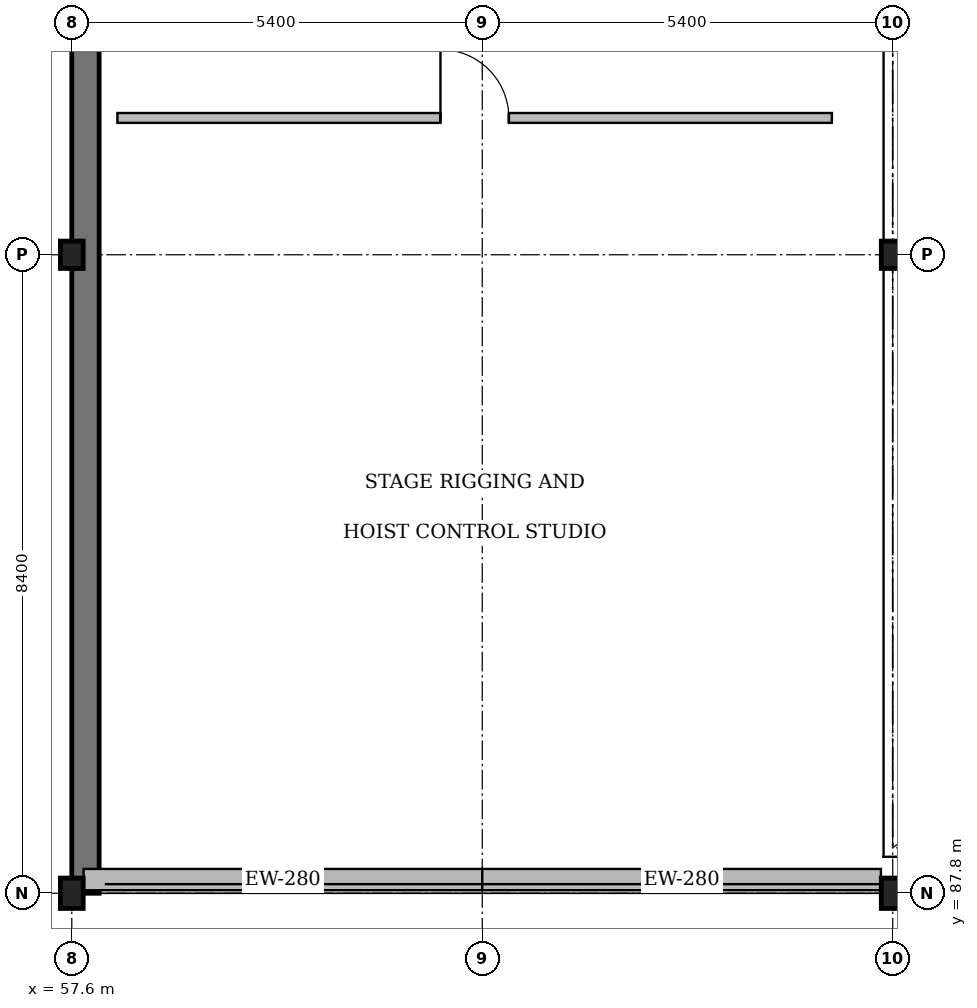
"""IFC4 building model, lengths in metres.
Left out: names, types, materials, properties, quantities, classifications, styles, units other than length and angle.
Written with IfcOpenShell. Run it as: python <this file> out.ifc"""

import sys

from ifc_helpers import new_model, si_unit, direction, frame, frame_2d, origin, origin_2d, place, context, subcontext, project, spatial, rectangle, i_section, extrude, element, fill, save


model = new_model("IFC4")
c1 = context("Model", 3, precision=1e-05, world=origin(), true_north=direction((0.0, 1.0)))
c2 = subcontext(c1, "Body", "Model", "MODEL_VIEW")
j1 = project(units=[si_unit("LENGTHUNIT", "METRE"), si_unit("PLANEANGLEUNIT", "RADIAN")], contexts=[c1])
p1 = place(None, origin())
s1 = spatial("IfcSite", under=j1, at=p1, CompositionType="ELEMENT")
p2 = place(p1, origin())
s2 = spatial("IfcBuilding", under=s1, at=p2, CompositionType="ELEMENT")
p3 = place(p2, frame((0.0, 0.0, 17.1)))
s3 = spatial("IfcBuildingStorey", under=s2, at=p3, CompositionType="ELEMENT", Elevation=17.1)
p4 = place(p3, frame((68.4, 87.8, 0.0), z_axis=(0.0, 0.0, 1.0), x_axis=(1.0, 0.0, 0.0)))
e1 = element("IfcColumn", 1, at=p4, inside=s3, PredefinedType="COLUMN", context=c2, shape_type="SweptSolid", body=[
    extrude(i_section(OverallWidth=0.3, OverallDepth=0.4, WebThickness=0.013, FlangeThickness=0.024, FilletRadius=0.027, at=origin_2d()), origin(), (0.0, 0.0, 1.0), 3.9),
])
p5 = place(p3, frame((68.4, 96.2, 0.0), z_axis=(0.0, 0.0, 1.0), x_axis=(1.0, 0.0, 0.0)))
e2 = element("IfcColumn", 2, at=p5, inside=s3, PredefinedType="COLUMN", context=c2, shape_type="SweptSolid", body=[
    extrude(i_section(OverallWidth=0.3, OverallDepth=0.36, WebThickness=0.012, FlangeThickness=0.022, FilletRadius=0.027, at=origin_2d()), origin(), (0.0, 0.0, 1.0), 3.9),
])
p6 = place(p3, frame((57.6, 87.8, 0.0), z_axis=(0.0, 0.0, 1.0), x_axis=(1.0, 0.0, 0.0)))
e3 = element("IfcColumn", 3, at=p6, inside=s3, PredefinedType="COLUMN", context=c2, shape_type="SweptSolid", body=[
    extrude(i_section(OverallWidth=0.3, OverallDepth=0.4, WebThickness=0.013, FlangeThickness=0.024, FilletRadius=0.027, at=origin_2d()), origin(), (0.0, 0.0, 1.0), 3.9),
])
p7 = place(p3, frame((57.6, 96.2, 0.0), z_axis=(0.0, 0.0, 1.0), x_axis=(1.0, 0.0, 0.0)))
e4 = element("IfcColumn", 4, at=p7, inside=s3, PredefinedType="COLUMN", context=c2, shape_type="SweptSolid", body=[
    extrude(i_section(OverallWidth=0.3, OverallDepth=0.36, WebThickness=0.012, FlangeThickness=0.022, FilletRadius=0.027, at=origin_2d()), origin(), (0.0, 0.0, 1.0), 3.9),
])
p8 = place(p3, frame((57.78, 87.8, 0.0), z_axis=(0.0, 0.0, 1.0), x_axis=(0.0, 1.0, 0.0)))
e5 = element("IfcWall", 5, at=p8, inside=s3, PredefinedType="SOLIDWALL", context=c2, shape_type="SweptSolid", body=[
    extrude(rectangle(XDim=24.0, YDim=0.36, at=frame_2d((12.0, 0.0))), origin(), (0.0, 0.0, 1.0), 3.65),
])
p9 = place(p3, frame((57.755, 87.98, 0.08), z_axis=(0.0, 0.0, 1.0), x_axis=(1.0, 0.0, 0.0)))
e6 = element("IfcWall", 6, at=p9, inside=s3, PredefinedType="SOLIDWALL", context=c2, shape_type="SweptSolid", body=[
    extrude(rectangle(XDim=5.245, YDim=0.28, at=frame_2d((2.623, 0.0))), origin(), (0.0, 0.0, 1.0), 3.083),
])
p10 = place(p3, frame((63.0, 87.98, 2.165), z_axis=(0.0, 0.0, 1.0), x_axis=(1.0, 0.0, 0.0)))
e7 = element("IfcWall", 7, at=p10, inside=s3, PredefinedType="SOLIDWALL", context=c2, shape_type="SweptSolid", body=[
    extrude(rectangle(XDim=5.245, YDim=0.28, at=frame_2d((2.623, 0.0))), origin(), (0.0, 0.0, 1.0), 0.998),
])
p11 = place(p3, frame((58.2, 98.0, 0.0), z_axis=(0.0, 0.0, 1.0), x_axis=(1.0, 0.0, 0.0)))
e8 = element("IfcWall", 8, at=p11, inside=s3, PredefinedType="PARTITIONING", context=c2, shape_type="SweptSolid", body=[
    extrude(rectangle(XDim=9.4, YDim=0.13, at=frame_2d((4.7, 0.0))), origin(), (0.0, 0.0, 1.0), 3.68),
])
p12 = place(p11, frame((4.25, 0.0, 0.0)))
e9 = element("IfcOpeningElement", 9, at=p12, cuts=e8, PredefinedType="OPENING", context=c2, shape_type="SweptSolid", body=[
    extrude(rectangle(XDim=0.9, YDim=2.15, at=frame_2d((0.45, 1.075))), frame((0.0, 0.085, 0.0), z_axis=(0.0, -1.0, 0.0), x_axis=(1.0, 0.0, 0.0)), (0.0, 0.0, 1.0), 0.17),
])
p13 = place(p12, origin())
e10 = element("IfcDoor", 10, at=p13, inside=s3, OperationType="SINGLE_SWING_LEFT", PredefinedType="DOOR", context=c2, shape_type="SweptSolid", body=[
    extrude(rectangle(XDim=0.9, YDim=2.15, at=frame_2d((0.45, 1.075))), frame((0.0, 0.025, 0.0), z_axis=(0.0, -1.0, 0.0), x_axis=(1.0, 0.0, 0.0)), (0.0, 0.0, 1.0), 0.05),
])
fill(e9, e10)
save(model, sys.argv[1])
